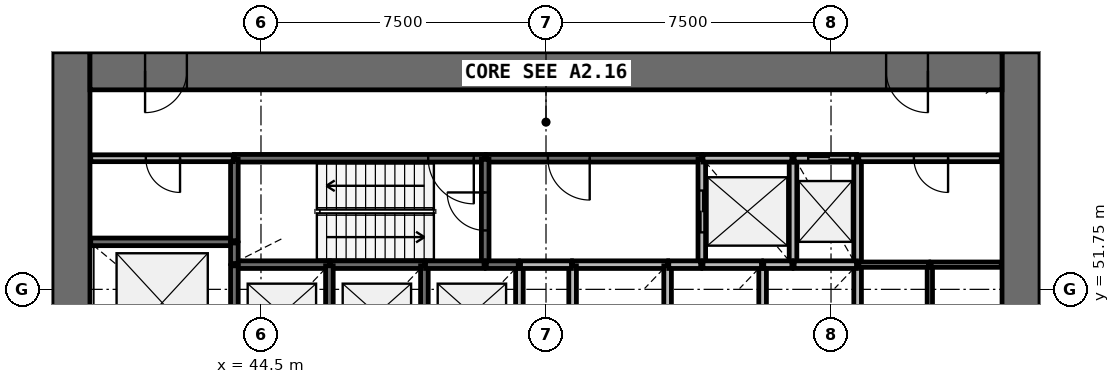
"""IFC4 building model, lengths in metres.
Left out: names, types, materials, properties, quantities, classifications, styles, units other than length and angle.
Written with IfcOpenShell. Run it as: python <this file> out.ifc"""

import sys

from ifc_helpers import new_model, si_unit, direction, frame, frame_2d, origin, place, context, subcontext, project, spatial, rectangle, extrude, source, transform, mapped, element, fill, save


model = new_model("IFC4")
c1 = context("Model", 3, precision=1e-05, world=origin(), true_north=direction((0.0, 1.0)))
c2 = subcontext(c1, "Body", "Model", "MODEL_VIEW")
j1 = project(units=[si_unit("LENGTHUNIT", "METRE"), si_unit("PLANEANGLEUNIT", "RADIAN")], contexts=[c1])
p1 = place(None, origin())
s1 = spatial("IfcSite", under=j1, at=p1, CompositionType="ELEMENT")
p2 = place(p1, origin())
s2 = spatial("IfcBuilding", under=s1, at=p2, CompositionType="ELEMENT")
p3 = place(p2, frame((0.0, 0.0, 66.6)))
s3 = spatial("IfcBuildingStorey", under=s2, at=p3, CompositionType="ELEMENT", Elevation=66.6)
p4 = place(p3, frame((64.5, 38.0, 0.0), z_axis=(0.0, 0.0, 1.0), x_axis=(0.0, 1.0, 0.0)))
e1 = element("IfcWall", 1, at=p4, inside=s3, PredefinedType="SHEAR", context=c2, shape_type="SweptSolid", body=[
    extrude(rectangle(XDim=20.0, YDim=1.0, at=frame_2d((10.0, 0.0))), origin(), (0.0, 0.0, 1.0), 4.4),
])
p5 = place(p4, frame((9.1, 0.0, 0.0)))
e2 = element("IfcOpeningElement", 2, at=p5, cuts=e1, PredefinedType="OPENING", context=c2, shape_type="SweptSolid", body=[
    extrude(rectangle(XDim=1.8, YDim=2.1, at=frame_2d((0.9, 1.05))), frame((0.0, 0.51, 0.0), z_axis=(0.0, -1.0, 0.0), x_axis=(1.0, 0.0, 0.0)), (0.0, 0.0, 1.0), 1.02),
])
p6 = place(p3, frame((39.5, 58.0, 0.0), z_axis=(0.0, 0.0, 1.0), x_axis=(0.0, -1.0, 0.0)))
e3 = element("IfcWall", 3, at=p6, inside=s3, PredefinedType="SHEAR", context=c2, shape_type="SweptSolid", body=[
    extrude(rectangle(XDim=20.0, YDim=1.0, at=frame_2d((10.0, 0.0))), origin(), (0.0, 0.0, 1.0), 4.4),
])
p7 = place(p6, frame((9.1, 0.0, 0.0)))
e4 = element("IfcOpeningElement", 4, at=p7, cuts=e3, PredefinedType="OPENING", context=c2, shape_type="SweptSolid", body=[
    extrude(rectangle(XDim=1.8, YDim=2.1, at=frame_2d((0.9, 1.05))), frame((0.0, 0.51, 0.0), z_axis=(0.0, -1.0, 0.0), x_axis=(1.0, 0.0, 0.0)), (0.0, 0.0, 1.0), 1.02),
])
p8 = place(p3, frame((64.0, 57.5, 0.0), z_axis=(0.0, 0.0, 1.0), x_axis=(-1.0, 0.0, 0.0)))
e5 = element("IfcWall", 5, at=p8, inside=s3, PredefinedType="SHEAR", context=c2, shape_type="SweptSolid", body=[
    extrude(rectangle(XDim=24.0, YDim=1.0, at=frame_2d((12.0, 0.0))), origin(), (0.0, 0.0, 1.0), 4.4),
])
p9 = place(p8, frame((21.45, 0.0, 0.0)))
e6 = element("IfcOpeningElement", 6, at=p9, cuts=e5, PredefinedType="OPENING", context=c2, shape_type="SweptSolid", body=[
    extrude(rectangle(XDim=1.1, YDim=2.1, at=frame_2d((0.55, 1.05))), frame((0.0, 0.51, 0.0), z_axis=(0.0, -1.0, 0.0), x_axis=(1.0, 0.0, 0.0)), (0.0, 0.0, 1.0), 1.02),
])
p10 = place(p8, frame((1.95, 0.0, 0.0)))
e7 = element("IfcOpeningElement", 7, at=p10, cuts=e5, PredefinedType="OPENING", context=c2, shape_type="SweptSolid", body=[
    extrude(rectangle(XDim=1.1, YDim=2.1, at=frame_2d((0.55, 1.05))), frame((0.0, 0.51, 0.0), z_axis=(0.0, -1.0, 0.0), x_axis=(1.0, 0.0, 0.0)), (0.0, 0.0, 1.0), 1.02),
])
p11 = place(p3, frame((50.4, 55.2, 0.0), z_axis=(0.0, 0.0, 1.0), x_axis=(-1.0, 0.0, 0.0)))
e8 = element("IfcWall", 8, at=p11, inside=s3, PredefinedType="SOLIDWALL", context=c2, shape_type="SweptSolid", body=[
    extrude(rectangle(XDim=6.6, YDim=0.2, at=frame_2d((3.3, 0.0))), origin(), (0.0, 0.0, 1.0), 3.95),
])
p12 = place(p11, frame((0.3, 0.0, 0.0)))
e9 = element("IfcOpeningElement", 9, at=p12, cuts=e8, PredefinedType="OPENING", context=c2, shape_type="SweptSolid", body=[
    extrude(rectangle(XDim=1.2, YDim=2.1, at=frame_2d((0.6, 1.05))), frame((0.0, 0.11, 0.0), z_axis=(0.0, -1.0, 0.0), x_axis=(1.0, 0.0, 0.0)), (0.0, 0.0, 1.0), 0.22),
])
p13 = place(p3, frame((56.1, 55.2, 0.0), z_axis=(0.0, 0.0, 1.0), x_axis=(-1.0, 0.0, 0.0)))
e10 = element("IfcWall", 10, at=p13, inside=s3, PredefinedType="SOLIDWALL", context=c2, shape_type="SweptSolid", body=[
    extrude(rectangle(XDim=5.67, YDim=0.2, at=frame_2d((2.835, 0.0))), origin(), (0.0, 0.0, 1.0), 3.95),
])
p14 = place(p13, frame((2.95, 0.0, 0.0)))
e11 = element("IfcOpeningElement", 11, at=p14, cuts=e10, PredefinedType="OPENING", context=c2, shape_type="SweptSolid", body=[
    extrude(rectangle(XDim=1.1, YDim=2.1, at=frame_2d((0.55, 1.05))), frame((0.0, 0.11, 0.0), z_axis=(0.0, -1.0, 0.0), x_axis=(1.0, 0.0, 0.0)), (0.0, 0.0, 1.0), 0.22),
])
p15 = place(p3, frame((43.8, 53.0, 0.0), z_axis=(0.0, 0.0, 1.0), x_axis=(-1.0, 0.0, 0.0)))
e12 = element("IfcWall", 12, at=p15, inside=s3, PredefinedType="SOLIDWALL", context=c2, shape_type="SweptSolid", body=[
    extrude(rectangle(XDim=3.78, YDim=0.2, at=frame_2d((1.89, 0.0))), origin(), (0.0, 0.0, 1.0), 3.95),
])
p16 = place(p3, frame((50.4, 52.4, 0.0), z_axis=(0.0, 0.0, 1.0), x_axis=(0.0, 1.0, 0.0)))
e13 = element("IfcWall", 13, at=p16, inside=s3, PredefinedType="SOLIDWALL", context=c2, shape_type="SweptSolid", body=[
    extrude(rectangle(XDim=2.77, YDim=0.2, at=frame_2d((1.385, 0.0))), origin(), (0.0, 0.0, 1.0), 3.95),
])
p17 = place(p16, frame((0.9, 0.0, 0.0)))
e14 = element("IfcOpeningElement", 14, at=p17, cuts=e13, PredefinedType="OPENING", context=c2, shape_type="SweptSolid", body=[
    extrude(rectangle(XDim=1.0, YDim=2.1, at=frame_2d((0.5, 1.05))), frame((0.0, 0.11, 0.0), z_axis=(0.0, -1.0, 0.0), x_axis=(1.0, 0.0, 0.0)), (0.0, 0.0, 1.0), 0.22),
])
p18 = place(p3, frame((56.1, 55.17, 0.0), z_axis=(0.0, 0.0, 1.0), x_axis=(0.0, -1.0, 0.0)))
e15 = element("IfcWall", 15, at=p18, inside=s3, PredefinedType="SOLIDWALL", context=c2, shape_type="SweptSolid", body=[
    extrude(rectangle(XDim=2.77, YDim=0.2, at=frame_2d((1.385, 0.0))), origin(), (0.0, 0.0, 1.0), 3.95),
])
p19 = place(p18, frame((0.82, 0.0, 0.0)))
e16 = element("IfcOpeningElement", 16, at=p19, cuts=e15, PredefinedType="OPENING", context=c2, shape_type="SweptSolid", body=[
    extrude(rectangle(XDim=1.1, YDim=2.1, at=frame_2d((0.55, 1.05))), frame((0.0, 0.11, 0.0), z_axis=(0.0, -1.0, 0.0), x_axis=(1.0, 0.0, 0.0)), (0.0, 0.0, 1.0), 0.22),
])
for number, where, z_axis, x_axis in (
    (17, (58.5, 52.4, 0.0), (0.0, 0.0, 1.0), (0.0, 1.0, 0.0)),
    (18, (60.2, 52.4, 0.0), (0.0, 0.0, 1.0), (0.0, 1.0, 0.0)),
):
    element("IfcWall", number, at=place(p3, frame(where, z_axis=z_axis, x_axis=x_axis)), inside=s3, PredefinedType="SOLIDWALL", context=c2, shape_type="SweptSolid", body=[
        extrude(rectangle(XDim=2.8, YDim=0.2, at=frame_2d((1.4, 0.0))), origin(), (0.0, 0.0, 1.0), 3.95),
    ])
p20 = place(p3, frame((46.3, 52.4, 0.0), z_axis=(0.0, 0.0, 1.0), x_axis=(-1.0, 0.0, 0.0)))
e19 = element("IfcWall", 19, at=p20, inside=s3, PredefinedType="SOLIDWALL", context=c2, shape_type="SweptSolid", body=[
    extrude(rectangle(XDim=2.5, YDim=0.2, at=frame_2d((1.25, 0.0))), origin(), (0.0, 0.0, 1.0), 3.95),
])
p21 = place(p3, frame((48.8, 52.4, 0.0), z_axis=(0.0, 0.0, 1.0), x_axis=(-1.0, 0.0, 0.0)))
e20 = element("IfcWall", 20, at=p21, inside=s3, PredefinedType="SOLIDWALL", context=c2, shape_type="SweptSolid", body=[
    extrude(rectangle(XDim=2.47, YDim=0.2, at=frame_2d((1.235, 0.0))), origin(), (0.0, 0.0, 1.0), 3.95),
])
p22 = place(p3, frame((55.2, 52.4, 0.0), z_axis=(0.0, 0.0, 1.0), x_axis=(-1.0, 0.0, 0.0)))
e21 = element("IfcWall", 21, at=p22, inside=s3, PredefinedType="SOLIDWALL", context=c2, shape_type="SweptSolid", body=[
    extrude(rectangle(XDim=2.5, YDim=0.2, at=frame_2d((1.25, 0.0))), origin(), (0.0, 0.0, 1.0), 3.95),
])
p23 = place(p3, frame((58.47, 55.2, 0.0), z_axis=(0.0, 0.0, 1.0), x_axis=(-1.0, 0.0, 0.0)))
e22 = element("IfcWall", 22, at=p23, inside=s3, PredefinedType="SOLIDWALL", context=c2, shape_type="SweptSolid", body=[
    extrude(rectangle(XDim=2.34, YDim=0.2, at=frame_2d((1.17, 0.0))), origin(), (0.0, 0.0, 1.0), 3.95),
])
for number, where, z_axis, x_axis in (
    (23, (43.8, 52.37, 0.0), (0.0, 0.0, 1.0), (0.0, -1.0, 0.0)),
    (24, (46.3, 50.01, 0.0), (0.0, 0.0, 1.0), (0.0, 1.0, 0.0)),
    (25, (48.8, 50.01, 0.0), (0.0, 0.0, 1.0), (0.0, 1.0, 0.0)),
):
    element("IfcWall", number, at=place(p3, frame(where, z_axis=z_axis, x_axis=x_axis)), inside=s3, PredefinedType="SOLIDWALL", context=c2, shape_type="SweptSolid", body=[
        extrude(rectangle(XDim=2.36, YDim=0.2, at=frame_2d((1.18, 0.0))), origin(), (0.0, 0.0, 1.0), 3.95),
    ])
p24 = place(p3, frame((51.3, 50.01, 0.0), z_axis=(0.0, 0.0, 1.0), x_axis=(0.0, 1.0, 0.0)))
e26 = element("IfcWall", 26, at=p24, inside=s3, PredefinedType="SOLIDWALL", context=c2, shape_type="SweptSolid", body=[
    extrude(rectangle(XDim=2.39, YDim=0.2, at=frame_2d((1.195, 0.0))), origin(), (0.0, 0.0, 1.0), 3.95),
])
for number, where, z_axis, x_axis in (
    (27, (52.7, 52.37, 0.0), (0.0, 0.0, 1.0), (0.0, -1.0, 0.0)),
    (28, (55.2, 50.01, 0.0), (0.0, 0.0, 1.0), (0.0, 1.0, 0.0)),
):
    element("IfcWall", number, at=place(p3, frame(where, z_axis=z_axis, x_axis=x_axis)), inside=s3, PredefinedType="SOLIDWALL", context=c2, shape_type="SweptSolid", body=[
        extrude(rectangle(XDim=2.36, YDim=0.2, at=frame_2d((1.18, 0.0))), origin(), (0.0, 0.0, 1.0), 3.95),
    ])
p25 = place(p3, frame((57.7, 50.01, 0.0), z_axis=(0.0, 0.0, 1.0), x_axis=(0.0, 1.0, 0.0)))
e29 = element("IfcWall", 29, at=p25, inside=s3, PredefinedType="SOLIDWALL", context=c2, shape_type="SweptSolid", body=[
    extrude(rectangle(XDim=2.39, YDim=0.2, at=frame_2d((1.195, 0.0))), origin(), (0.0, 0.0, 1.0), 3.95),
])
p26 = place(p3, frame((60.2, 50.01, 0.0), z_axis=(0.0, 0.0, 1.0), x_axis=(0.0, 1.0, 0.0)))
e30 = element("IfcWall", 30, at=p26, inside=s3, PredefinedType="SOLIDWALL", context=c2, shape_type="SweptSolid", body=[
    extrude(rectangle(XDim=2.36, YDim=0.2, at=frame_2d((1.18, 0.0))), origin(), (0.0, 0.0, 1.0), 3.95),
])
p27 = place(p3, frame((43.8, 55.17, 0.0), z_axis=(0.0, 0.0, 1.0), x_axis=(0.0, -1.0, 0.0)))
e31 = element("IfcWall", 31, at=p27, inside=s3, PredefinedType="SOLIDWALL", context=c2, shape_type="SweptSolid", body=[
    extrude(rectangle(XDim=2.14, YDim=0.2, at=frame_2d((1.07, 0.0))), origin(), (0.0, 0.0, 1.0), 3.95),
])
p28 = place(p3, frame((60.17, 52.4, 0.0), z_axis=(0.0, 0.0, 1.0), x_axis=(-1.0, 0.0, 0.0)))
e32 = element("IfcWall", 32, at=p28, inside=s3, PredefinedType="SOLIDWALL", context=c2, shape_type="SweptSolid", body=[
    extrude(rectangle(XDim=1.64, YDim=0.2, at=frame_2d((0.82, 0.0))), origin(), (0.0, 0.0, 1.0), 3.95),
])
p29 = place(p3, frame((60.17, 55.2, 0.0), z_axis=(0.0, 0.0, 1.0), x_axis=(-1.0, 0.0, 0.0)))
e33 = element("IfcWall", 33, at=p29, inside=s3, PredefinedType="SOLIDWALL", context=c2, shape_type="SweptSolid", body=[
    extrude(rectangle(XDim=1.64, YDim=0.2, at=frame_2d((0.82, 0.0))), origin(), (0.0, 0.0, 1.0), 3.95),
])
p30 = place(p29, frame((0.17, 0.0, 0.0)))
e34 = element("IfcOpeningElement", 34, at=p30, cuts=e33, PredefinedType="OPENING", context=c2, shape_type="SweptSolid", body=[
    extrude(rectangle(XDim=1.1, YDim=2.1, at=frame_2d((0.55, 1.05))), frame((0.0, 0.11, 0.0), z_axis=(0.0, -1.0, 0.0), x_axis=(1.0, 0.0, 0.0)), (0.0, 0.0, 1.0), 0.22),
])
for number, where, z_axis, x_axis in (
    (35, (50.37, 52.4, 0.0), (0.0, 0.0, 1.0), (-1.0, 0.0, 0.0)),
    (36, (57.67, 52.4, 0.0), (0.0, 0.0, 1.0), (-1.0, 0.0, 0.0)),
):
    element("IfcWall", number, at=place(p3, frame(where, z_axis=z_axis, x_axis=x_axis)), inside=s3, PredefinedType="SOLIDWALL", context=c2, shape_type="SweptSolid", body=[
        extrude(rectangle(XDim=1.54, YDim=0.2, at=frame_2d((0.77, 0.0))), origin(), (0.0, 0.0, 1.0), 3.95),
    ])
p31 = place(p3, frame((51.33, 52.4, 0.0), z_axis=(0.0, 0.0, 1.0), x_axis=(1.0, 0.0, 0.0)))
e37 = element("IfcWall", 37, at=p31, inside=s3, PredefinedType="SOLIDWALL", context=c2, shape_type="SweptSolid", body=[
    extrude(rectangle(XDim=1.34, YDim=0.2, at=frame_2d((0.67, 0.0))), origin(), (0.0, 0.0, 1.0), 3.95),
])
for number, where, z_axis, x_axis in (
    (38, (51.27, 52.4, 0.0), (0.0, 0.0, 1.0), (-1.0, 0.0, 0.0)),
    (39, (56.07, 52.4, 0.0), (0.0, 0.0, 1.0), (-1.0, 0.0, 0.0)),
):
    element("IfcWall", number, at=place(p3, frame(where, z_axis=z_axis, x_axis=x_axis)), inside=s3, PredefinedType="SOLIDWALL", context=c2, shape_type="SweptSolid", body=[
        extrude(rectangle(XDim=0.84, YDim=0.2, at=frame_2d((0.42, 0.0))), origin(), (0.0, 0.0, 1.0), 3.95),
    ])
p32 = place(p3, frame((58.47, 52.4, 0.0), z_axis=(0.0, 0.0, 1.0), x_axis=(-1.0, 0.0, 0.0)))
e40 = element("IfcWall", 40, at=p32, inside=s3, PredefinedType="SOLIDWALL", context=c2, shape_type="SweptSolid", body=[
    extrude(rectangle(XDim=0.74, YDim=0.2, at=frame_2d((0.37, 0.0))), origin(), (0.0, 0.0, 1.0), 3.95),
])
p33 = place(p3, frame((43.8, 52.43, 0.0), z_axis=(0.0, 0.0, 1.0), x_axis=(0.0, 1.0, 0.0)))
e41 = element("IfcWall", 41, at=p33, inside=s3, PredefinedType="SOLIDWALL", context=c2, shape_type="SweptSolid", body=[
    extrude(rectangle(XDim=0.54, YDim=0.2, at=frame_2d((0.27, 0.0))), origin(), (0.0, 0.0, 1.0), 3.95),
])
p34 = place(p3, frame((43.77, 55.2, 0.0), z_axis=(0.0, 0.0, 1.0), x_axis=(-1.0, 0.0, 0.0)))
e42 = element("IfcWall", 42, at=p34, inside=s3, PredefinedType="PARTITIONING", context=c2, shape_type="SweptSolid", body=[
    extrude(rectangle(XDim=3.75, YDim=0.18, at=frame_2d((1.875, 0.0))), origin(), (0.0, 0.0, 1.0), 3.95),
])
p35 = place(p34, frame((1.4, 0.0, 0.0)))
e43 = element("IfcOpeningElement", 43, at=p35, cuts=e42, PredefinedType="OPENING", context=c2, shape_type="SweptSolid", body=[
    extrude(rectangle(XDim=0.9, YDim=2.1, at=frame_2d((0.45, 1.05))), frame((0.0, 0.1, 0.0), z_axis=(0.0, -1.0, 0.0), x_axis=(1.0, 0.0, 0.0)), (0.0, 0.0, 1.0), 0.2),
])
p36 = place(p3, frame((63.98, 55.2, 0.0), z_axis=(0.0, 0.0, 1.0), x_axis=(-1.0, 0.0, 0.0)))
e44 = element("IfcWall", 44, at=p36, inside=s3, PredefinedType="PARTITIONING", context=c2, shape_type="SweptSolid", body=[
    extrude(rectangle(XDim=3.75, YDim=0.18, at=frame_2d((1.875, 0.0))), origin(), (0.0, 0.0, 1.0), 3.95),
])
p37 = place(p36, frame((1.4, 0.0, 0.0)))
e45 = element("IfcOpeningElement", 45, at=p37, cuts=e44, PredefinedType="OPENING", context=c2, shape_type="SweptSolid", body=[
    extrude(rectangle(XDim=0.9, YDim=2.1, at=frame_2d((0.45, 1.05))), frame((0.0, 0.1, 0.0), z_axis=(0.0, -1.0, 0.0), x_axis=(1.0, 0.0, 0.0)), (0.0, 0.0, 1.0), 0.2),
])
p38 = place(p3, frame((62.1, 50.01, 0.0), z_axis=(0.0, 0.0, 1.0), x_axis=(0.0, 1.0, 0.0)))
e46 = element("IfcWall", 46, at=p38, inside=s3, PredefinedType="PARTITIONING", context=c2, shape_type="SweptSolid", body=[
    extrude(rectangle(XDim=2.39, YDim=0.14, at=frame_2d((1.195, 0.0))), origin(), (0.0, 0.0, 1.0), 3.05),
])
p39 = place(p3, frame((62.07, 52.4, 0.0), z_axis=(0.0, 0.0, 1.0), x_axis=(-1.0, 0.0, 0.0)))
e47 = element("IfcWall", 47, at=p39, inside=s3, PredefinedType="PARTITIONING", context=c2, shape_type="SweptSolid", body=[
    extrude(rectangle(XDim=1.84, YDim=0.14, at=frame_2d((0.92, 0.0))), origin(), (0.0, 0.0, 1.0), 3.05),
])
p40 = place(p3, frame((63.98, 52.4, 0.0), z_axis=(0.0, 0.0, 1.0), x_axis=(-1.0, 0.0, 0.0)))
e48 = element("IfcWall", 48, at=p40, inside=s3, PredefinedType="PARTITIONING", context=c2, shape_type="SweptSolid", body=[
    extrude(rectangle(XDim=1.85, YDim=0.14, at=frame_2d((0.925, 0.0))), origin(), (0.0, 0.0, 1.0), 3.05),
])
m1 = source(origin(), c2, "Body", "SweptSolid", [
    extrude(rectangle(XDim=1.1, YDim=2.1, at=frame_2d((0.55, 1.05))), frame((0.0, 0.025, 0.0), z_axis=(0.0, -1.0, 0.0), x_axis=(1.0, 0.0, 0.0)), (0.0, 0.0, 1.0), 0.05),
])
p41 = place(p19, origin())
e49 = element("IfcDoor", 49, at=p41, inside=s3, OperationType="DOUBLE_DOOR_SLIDING", PredefinedType="USERDEFINED", context=c2, shape_type="MappedRepresentation", body=[
    mapped(m1, transform((0.0, 0.0, 0.0), scale=1.0)),
])
fill(e16, e49)
p42 = place(p30, origin())
e50 = element("IfcDoor", 50, at=p42, inside=s3, OperationType="DOUBLE_DOOR_SLIDING", PredefinedType="USERDEFINED", context=c2, shape_type="MappedRepresentation", body=[
    mapped(m1, transform((0.0, 0.0, 0.0), scale=1.0)),
])
fill(e34, e50)
m2 = source(origin(), c2, "Body", "SweptSolid", [
    extrude(rectangle(XDim=1.2, YDim=2.1, at=frame_2d((0.6, 1.05))), frame((0.0, 0.025, 0.0), z_axis=(0.0, -1.0, 0.0), x_axis=(1.0, 0.0, 0.0)), (0.0, 0.0, 1.0), 0.05),
])
p43 = place(p12, origin())
e51 = element("IfcDoor", 51, at=p43, inside=s3, OperationType="SINGLE_SWING_LEFT", PredefinedType="DOOR", context=c2, shape_type="MappedRepresentation", body=[
    mapped(m2, transform((0.0, 0.0, 0.0), scale=1.0)),
])
fill(e9, e51)
m3 = source(origin(), c2, "Body", "SweptSolid", [
    extrude(rectangle(XDim=1.0, YDim=2.1, at=frame_2d((0.5, 1.05))), frame((0.0, 0.025, 0.0), z_axis=(0.0, -1.0, 0.0), x_axis=(1.0, 0.0, 0.0)), (0.0, 0.0, 1.0), 0.05),
])
p44 = place(p17, origin())
e52 = element("IfcDoor", 52, at=p44, inside=s3, OperationType="SINGLE_SWING_RIGHT", PredefinedType="DOOR", context=c2, shape_type="MappedRepresentation", body=[
    mapped(m3, transform((0.0, 0.0, 0.0), scale=1.0)),
])
fill(e14, e52)
m4 = source(origin(), c2, "Body", "SweptSolid", [
    extrude(rectangle(XDim=1.1, YDim=2.1, at=frame_2d((0.55, 1.05))), frame((0.0, 0.025, 0.0), z_axis=(0.0, -1.0, 0.0), x_axis=(1.0, 0.0, 0.0)), (0.0, 0.0, 1.0), 0.05),
])
p45 = place(p14, origin())
e53 = element("IfcDoor", 53, at=p45, inside=s3, OperationType="SINGLE_SWING_LEFT", PredefinedType="DOOR", context=c2, shape_type="MappedRepresentation", body=[
    mapped(m4, transform((0.0, 0.0, 0.0), scale=1.0)),
])
fill(e11, e53)
m5 = source(origin(), c2, "Body", "SweptSolid", [
    extrude(rectangle(XDim=1.1, YDim=2.1, at=frame_2d((0.55, 1.05))), frame((0.0, 0.025, 0.0), z_axis=(0.0, -1.0, 0.0), x_axis=(1.0, 0.0, 0.0)), (0.0, 0.0, 1.0), 0.05),
])
p46 = place(p9, origin())
e54 = element("IfcDoor", 54, at=p46, inside=s3, OperationType="SINGLE_SWING_RIGHT", PredefinedType="DOOR", context=c2, shape_type="MappedRepresentation", body=[
    mapped(m5, transform((0.0, 0.0, 0.0), scale=1.0)),
])
fill(e6, e54)
p47 = place(p10, origin())
e55 = element("IfcDoor", 55, at=p47, inside=s3, OperationType="SINGLE_SWING_LEFT", PredefinedType="DOOR", context=c2, shape_type="MappedRepresentation", body=[
    mapped(m5, transform((0.0, 0.0, 0.0), scale=1.0)),
])
fill(e7, e55)
m6 = source(origin(), c2, "Body", "SweptSolid", [
    extrude(rectangle(XDim=0.9, YDim=2.1, at=frame_2d((0.45, 1.05))), frame((0.0, 0.025, 0.0), z_axis=(0.0, -1.0, 0.0), x_axis=(1.0, 0.0, 0.0)), (0.0, 0.0, 1.0), 0.05),
])
p48 = place(p35, origin())
e56 = element("IfcDoor", 56, at=p48, inside=s3, OperationType="SINGLE_SWING_LEFT", PredefinedType="DOOR", context=c2, shape_type="MappedRepresentation", body=[
    mapped(m6, transform((0.0, 0.0, 0.0), scale=1.0)),
])
fill(e43, e56)
p49 = place(p37, origin())
e57 = element("IfcDoor", 57, at=p49, inside=s3, OperationType="SINGLE_SWING_LEFT", PredefinedType="DOOR", context=c2, shape_type="MappedRepresentation", body=[
    mapped(m6, transform((0.0, 0.0, 0.0), scale=1.0)),
])
fill(e45, e57)
save(model, sys.argv[1])
